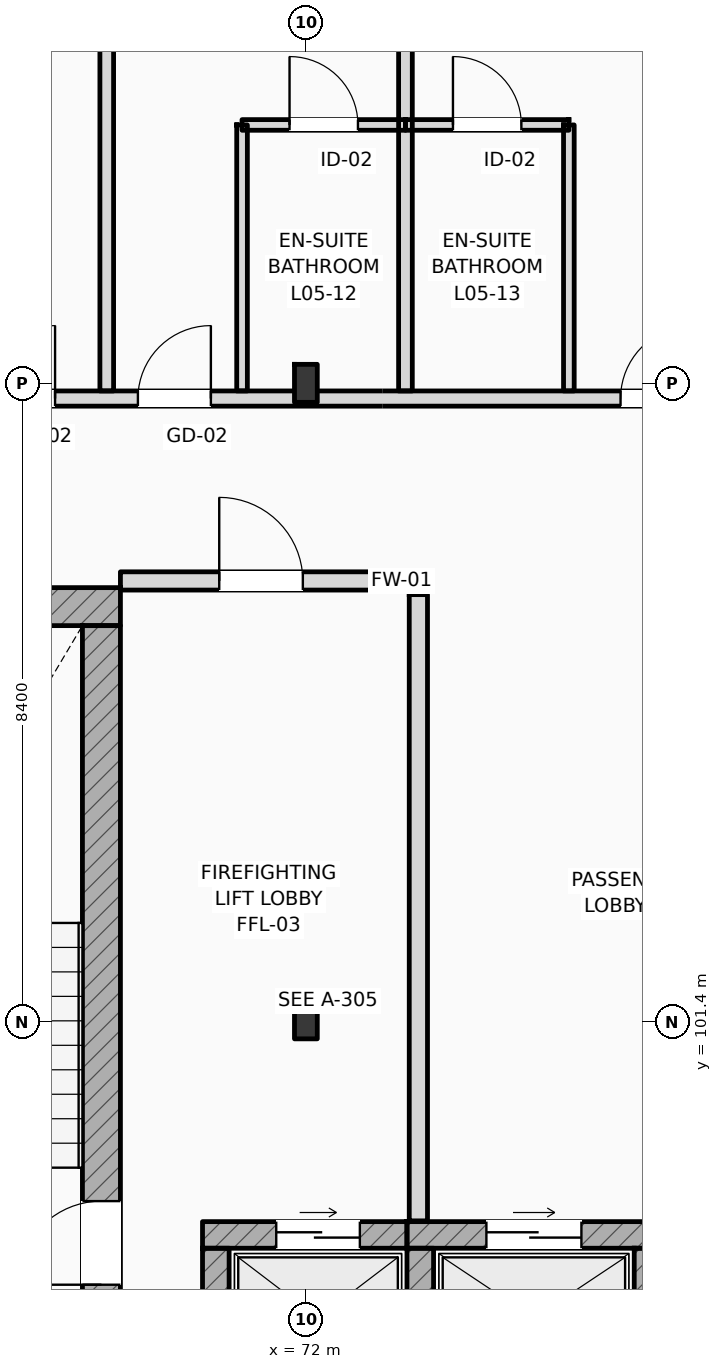
"""IFC4 building model, lengths in metres.
Left out: names, types, materials, properties, quantities, classifications, styles, units other than length and angle.
Written with IfcOpenShell. Run it as: python <this file> out.ifc"""

import sys

from ifc_helpers import new_model, si_unit, direction, frame, frame_2d, origin, origin_2d, place, context, subcontext, project, spatial, rectangle, i_section, extrude, element, fill, save


model = new_model("IFC4")
c1 = context("Model", 3, precision=1e-05, world=origin(), true_north=direction((0.0, 1.0)))
c2 = subcontext(c1, "Body", "Model", "MODEL_VIEW")
j1 = project(units=[si_unit("LENGTHUNIT", "METRE"), si_unit("PLANEANGLEUNIT", "RADIAN")], contexts=[c1])
p1 = place(None, origin())
s1 = spatial("IfcSite", under=j1, at=p1, CompositionType="ELEMENT")
p2 = place(p1, origin())
s2 = spatial("IfcBuilding", under=s1, at=p2, CompositionType="ELEMENT")
p3 = place(p2, frame((0.0, 0.0, 24.6)))
s3 = spatial("IfcBuildingStorey", under=s2, at=p3, CompositionType="ELEMENT", Elevation=24.6)
p4 = place(p3, frame((72.0, 101.4, 0.0), z_axis=(0.0, 0.0, 1.0), x_axis=(1.0, 0.0, 0.0)))
e1 = element("IfcColumn", 1, at=p4, inside=s3, PredefinedType="COLUMN", context=c2, shape_type="SweptSolid", body=[
    extrude(i_section(OverallWidth=0.3, OverallDepth=0.45, WebThickness=0.014, FlangeThickness=0.026, FilletRadius=0.027, at=origin_2d()), origin(), (0.0, 0.0, 1.0), 3.6),
])
p5 = place(p3, frame((72.0, 109.8, 0.0), z_axis=(0.0, 0.0, 1.0), x_axis=(1.0, 0.0, 0.0)))
e2 = element("IfcColumn", 2, at=p5, inside=s3, PredefinedType="COLUMN", context=c2, shape_type="SweptSolid", body=[
    extrude(i_section(OverallWidth=0.3, OverallDepth=0.5, WebThickness=0.014, FlangeThickness=0.028, FilletRadius=0.027, at=origin_2d()), origin(), (0.0, 0.0, 1.0), 3.6),
])
p6 = place(p3, frame((64.4, 106.862, 0.0), z_axis=(0.0, 0.0, 1.0), x_axis=(1.0, 0.0, 0.0)))
e3 = element("IfcWall", 3, at=p6, inside=s3, PredefinedType="SHEAR", context=c2, shape_type="SweptSolid", body=[
    extrude(rectangle(XDim=5.16, YDim=0.5, at=frame_2d((2.58, 0.0))), origin(), (0.0, 0.0, 1.0), 3.6),
])
p7 = place(p3, frame((69.31, 97.5, 0.0), z_axis=(0.0, 0.0, 1.0), x_axis=(0.0, 1.0, 0.0)))
e4 = element("IfcWall", 4, at=p7, inside=s3, PredefinedType="SHEAR", context=c2, shape_type="SweptSolid", body=[
    extrude(rectangle(XDim=9.112, YDim=0.5, at=frame_2d((4.556, 0.0))), origin(), (0.0, 0.0, 1.0), 3.6),
])
p8 = place(p7, frame((0.44, 0.0, 0.0)))
e5 = element("IfcOpeningElement", 5, at=p8, cuts=e4, PredefinedType="OPENING", context=c2, shape_type="SweptSolid", body=[
    extrude(rectangle(XDim=1.1, YDim=2.2, at=frame_2d((0.55, 1.1))), frame((0.0, 0.26, 0.0), z_axis=(0.0, -1.0, 0.0), x_axis=(1.0, 0.0, 0.0)), (0.0, 0.0, 1.0), 0.52),
])
p9 = place(p3, frame((70.64, 98.595, 0.0), z_axis=(0.0, 0.0, 1.0), x_axis=(1.0, 0.0, 0.0)))
e6 = element("IfcWall", 6, at=p9, inside=s3, PredefinedType="SHEAR", context=c2, shape_type="SweptSolid", body=[
    extrude(rectangle(XDim=2.69, YDim=0.35, at=frame_2d((1.345, 0.0))), origin(), (0.0, 0.0, 1.0), 3.34),
])
p10 = place(p9, frame((0.97, 0.0, 0.0)))
e7 = element("IfcOpeningElement", 7, at=p10, cuts=e6, PredefinedType="OPENING", context=c2, shape_type="SweptSolid", body=[
    extrude(rectangle(XDim=1.1, YDim=2.2, at=frame_2d((0.55, 1.1))), frame((0.0, 0.185, 0.0), z_axis=(0.0, -1.0, 0.0), x_axis=(1.0, 0.0, 0.0)), (0.0, 0.0, 1.0), 0.37),
])
p11 = place(p3, frame((70.815, 96.58, 0.0), z_axis=(0.0, 0.0, 1.0), x_axis=(0.0, 1.0, 0.0)))
e8 = element("IfcWall", 8, at=p11, inside=s3, PredefinedType="SHEAR", context=c2, shape_type="SweptSolid", body=[
    extrude(rectangle(XDim=1.84, YDim=0.35, at=frame_2d((0.92, 0.0))), origin(), (0.0, 0.0, 1.0), 3.34),
])
p12 = place(p3, frame((73.33, 98.595, 0.0), z_axis=(0.0, 0.0, 1.0), x_axis=(1.0, 0.0, 0.0)))
e9 = element("IfcWall", 9, at=p12, inside=s3, PredefinedType="SHEAR", context=c2, shape_type="SweptSolid", body=[
    extrude(rectangle(XDim=3.34, YDim=0.35, at=frame_2d((1.67, 0.0))), origin(), (0.0, 0.0, 1.0), 3.34),
])
p13 = place(p12, frame((1.045, 0.0, 0.0)))
e10 = element("IfcOpeningElement", 10, at=p13, cuts=e9, PredefinedType="OPENING", context=c2, shape_type="SweptSolid", body=[
    extrude(rectangle(XDim=1.25, YDim=2.25, at=frame_2d((0.625, 1.125))), frame((0.0, 0.185, 0.0), z_axis=(0.0, -1.0, 0.0), x_axis=(1.0, 0.0, 0.0)), (0.0, 0.0, 1.0), 0.37),
])
for number, where, z_axis, x_axis in (
    (11, (73.505, 96.58, 0.0), (0.0, 0.0, 1.0), (0.0, 1.0, 0.0)),
    (12, (76.495, 96.58, 0.0), (0.0, 0.0, 1.0), (0.0, 1.0, 0.0)),
):
    element("IfcWall", number, at=place(p3, frame(where, z_axis=z_axis, x_axis=x_axis)), inside=s3, PredefinedType="SHEAR", context=c2, shape_type="SweptSolid", body=[
        extrude(rectangle(XDim=1.84, YDim=0.35, at=frame_2d((0.92, 0.0))), origin(), (0.0, 0.0, 1.0), 3.34),
    ])
p14 = place(p3, frame((73.48, 98.78, 0.0), z_axis=(0.0, 0.0, 1.0), x_axis=(0.0, 1.0, 0.0)))
e13 = element("IfcWall", 13, at=p14, inside=s3, PredefinedType="STANDARD", context=c2, shape_type="SweptSolid", body=[
    extrude(rectangle(XDim=8.24, YDim=0.24, at=frame_2d((4.12, 0.0))), origin(), (0.0, 0.0, 1.0), 3.34),
])
p15 = place(p3, frame((69.56, 107.2, 0.0), z_axis=(0.0, 0.0, 1.0), x_axis=(1.0, 0.0, 0.0)))
e14 = element("IfcWall", 14, at=p15, inside=s3, PredefinedType="STANDARD", context=c2, shape_type="SweptSolid", body=[
    extrude(rectangle(XDim=4.1, YDim=0.24, at=frame_2d((2.05, 0.0))), origin(), (0.0, 0.0, 1.0), 3.34),
])
p16 = place(p15, frame((1.3, 0.0, 0.0)))
e15 = element("IfcOpeningElement", 15, at=p16, cuts=e14, PredefinedType="OPENING", context=c2, shape_type="SweptSolid", body=[
    extrude(rectangle(XDim=1.1, YDim=2.2, at=frame_2d((0.55, 1.1))), frame((0.0, 0.13, 0.0), z_axis=(0.0, -1.0, 0.0), x_axis=(1.0, 0.0, 0.0)), (0.0, 0.0, 1.0), 0.26),
])
p17 = place(p3, frame((10.65, 109.6, 0.0), z_axis=(0.0, 0.0, 1.0), x_axis=(1.0, 0.0, 0.0)))
e16 = element("IfcWall", 16, at=p17, inside=s3, PredefinedType="PARTITIONING", context=c2, shape_type="SweptSolid", body=[
    extrude(rectangle(XDim=109.21, YDim=0.2, at=frame_2d((54.605, 0.0))), origin(), (0.0, 0.0, 1.0), 2.78),
])
p18 = place(p17, frame((12.705, 0.0, 0.0)))
e17 = element("IfcOpeningElement", 17, at=p18, cuts=e16, PredefinedType="OPENING", context=c2, shape_type="SweptSolid", body=[
    extrude(rectangle(XDim=1.02, YDim=2.2, at=frame_2d((0.51, 1.1))), frame((0.0, 0.11, 0.0), z_axis=(0.0, -1.0, 0.0), x_axis=(1.0, 0.0, 0.0)), (0.0, 0.0, 1.0), 0.22),
])
p19 = place(p17, frame((19.26, 0.0, 0.0)))
e18 = element("IfcOpeningElement", 18, at=p19, cuts=e16, PredefinedType="OPENING", context=c2, shape_type="SweptSolid", body=[
    extrude(rectangle(XDim=1.02, YDim=2.2, at=frame_2d((0.51, 1.1))), frame((0.0, 0.11, 0.0), z_axis=(0.0, -1.0, 0.0), x_axis=(1.0, 0.0, 0.0)), (0.0, 0.0, 1.0), 0.22),
])
p20 = place(p17, frame((23.71, 0.0, 0.0)))
e19 = element("IfcOpeningElement", 19, at=p20, cuts=e16, PredefinedType="OPENING", context=c2, shape_type="SweptSolid", body=[
    extrude(rectangle(XDim=1.02, YDim=2.2, at=frame_2d((0.51, 1.1))), frame((0.0, 0.11, 0.0), z_axis=(0.0, -1.0, 0.0), x_axis=(1.0, 0.0, 0.0)), (0.0, 0.0, 1.0), 0.22),
])
p21 = place(p17, frame((27.66, 0.0, 0.0)))
e20 = element("IfcOpeningElement", 20, at=p21, cuts=e16, PredefinedType="OPENING", context=c2, shape_type="SweptSolid", body=[
    extrude(rectangle(XDim=1.02, YDim=2.2, at=frame_2d((0.51, 1.1))), frame((0.0, 0.11, 0.0), z_axis=(0.0, -1.0, 0.0), x_axis=(1.0, 0.0, 0.0)), (0.0, 0.0, 1.0), 0.22),
])
p22 = place(p17, frame((31.89, 0.0, 0.0)))
e21 = element("IfcOpeningElement", 21, at=p22, cuts=e16, PredefinedType="OPENING", context=c2, shape_type="SweptSolid", body=[
    extrude(rectangle(XDim=0.96, YDim=2.2, at=frame_2d((0.48, 1.1))), frame((0.0, 0.11, 0.0), z_axis=(0.0, -1.0, 0.0), x_axis=(1.0, 0.0, 0.0)), (0.0, 0.0, 1.0), 0.22),
])
p23 = place(p17, frame((33.94, 0.0, 0.0)))
e22 = element("IfcOpeningElement", 22, at=p23, cuts=e16, PredefinedType="OPENING", context=c2, shape_type="SweptSolid", body=[
    extrude(rectangle(XDim=0.96, YDim=2.2, at=frame_2d((0.48, 1.1))), frame((0.0, 0.11, 0.0), z_axis=(0.0, -1.0, 0.0), x_axis=(1.0, 0.0, 0.0)), (0.0, 0.0, 1.0), 0.22),
])
p24 = place(p17, frame((40.29, 0.0, 0.0)))
e23 = element("IfcOpeningElement", 23, at=p24, cuts=e16, PredefinedType="OPENING", context=c2, shape_type="SweptSolid", body=[
    extrude(rectangle(XDim=0.96, YDim=2.2, at=frame_2d((0.48, 1.1))), frame((0.0, 0.11, 0.0), z_axis=(0.0, -1.0, 0.0), x_axis=(1.0, 0.0, 0.0)), (0.0, 0.0, 1.0), 0.22),
])
p25 = place(p17, frame((42.34, 0.0, 0.0)))
e24 = element("IfcOpeningElement", 24, at=p25, cuts=e16, PredefinedType="OPENING", context=c2, shape_type="SweptSolid", body=[
    extrude(rectangle(XDim=0.96, YDim=2.2, at=frame_2d((0.48, 1.1))), frame((0.0, 0.11, 0.0), z_axis=(0.0, -1.0, 0.0), x_axis=(1.0, 0.0, 0.0)), (0.0, 0.0, 1.0), 0.22),
])
p26 = place(p17, frame((48.69, 0.0, 0.0)))
e25 = element("IfcOpeningElement", 25, at=p26, cuts=e16, PredefinedType="OPENING", context=c2, shape_type="SweptSolid", body=[
    extrude(rectangle(XDim=0.96, YDim=2.2, at=frame_2d((0.48, 1.1))), frame((0.0, 0.11, 0.0), z_axis=(0.0, -1.0, 0.0), x_axis=(1.0, 0.0, 0.0)), (0.0, 0.0, 1.0), 0.22),
])
p27 = place(p17, frame((50.74, 0.0, 0.0)))
e26 = element("IfcOpeningElement", 26, at=p27, cuts=e16, PredefinedType="OPENING", context=c2, shape_type="SweptSolid", body=[
    extrude(rectangle(XDim=0.96, YDim=2.2, at=frame_2d((0.48, 1.1))), frame((0.0, 0.11, 0.0), z_axis=(0.0, -1.0, 0.0), x_axis=(1.0, 0.0, 0.0)), (0.0, 0.0, 1.0), 0.22),
])
p28 = place(p17, frame((57.09, 0.0, 0.0)))
e27 = element("IfcOpeningElement", 27, at=p28, cuts=e16, PredefinedType="OPENING", context=c2, shape_type="SweptSolid", body=[
    extrude(rectangle(XDim=0.96, YDim=2.2, at=frame_2d((0.48, 1.1))), frame((0.0, 0.11, 0.0), z_axis=(0.0, -1.0, 0.0), x_axis=(1.0, 0.0, 0.0)), (0.0, 0.0, 1.0), 0.22),
])
p29 = place(p17, frame((59.14, 0.0, 0.0)))
e28 = element("IfcOpeningElement", 28, at=p29, cuts=e16, PredefinedType="OPENING", context=c2, shape_type="SweptSolid", body=[
    extrude(rectangle(XDim=0.96, YDim=2.2, at=frame_2d((0.48, 1.1))), frame((0.0, 0.11, 0.0), z_axis=(0.0, -1.0, 0.0), x_axis=(1.0, 0.0, 0.0)), (0.0, 0.0, 1.0), 0.22),
])
p30 = place(p17, frame((65.49, 0.0, 0.0)))
e29 = element("IfcOpeningElement", 29, at=p30, cuts=e16, PredefinedType="OPENING", context=c2, shape_type="SweptSolid", body=[
    extrude(rectangle(XDim=0.96, YDim=2.2, at=frame_2d((0.48, 1.1))), frame((0.0, 0.11, 0.0), z_axis=(0.0, -1.0, 0.0), x_axis=(1.0, 0.0, 0.0)), (0.0, 0.0, 1.0), 0.22),
])
p31 = place(p17, frame((67.54, 0.0, 0.0)))
e30 = element("IfcOpeningElement", 30, at=p31, cuts=e16, PredefinedType="OPENING", context=c2, shape_type="SweptSolid", body=[
    extrude(rectangle(XDim=0.96, YDim=2.2, at=frame_2d((0.48, 1.1))), frame((0.0, 0.11, 0.0), z_axis=(0.0, -1.0, 0.0), x_axis=(1.0, 0.0, 0.0)), (0.0, 0.0, 1.0), 0.22),
])
p32 = place(p17, frame((73.89, 0.0, 0.0)))
e31 = element("IfcOpeningElement", 31, at=p32, cuts=e16, PredefinedType="OPENING", context=c2, shape_type="SweptSolid", body=[
    extrude(rectangle(XDim=0.96, YDim=2.2, at=frame_2d((0.48, 1.1))), frame((0.0, 0.11, 0.0), z_axis=(0.0, -1.0, 0.0), x_axis=(1.0, 0.0, 0.0)), (0.0, 0.0, 1.0), 0.22),
])
p33 = place(p17, frame((78.09, 0.0, 0.0)))
e32 = element("IfcOpeningElement", 32, at=p33, cuts=e16, PredefinedType="OPENING", context=c2, shape_type="SweptSolid", body=[
    extrude(rectangle(XDim=0.96, YDim=2.2, at=frame_2d((0.48, 1.1))), frame((0.0, 0.11, 0.0), z_axis=(0.0, -1.0, 0.0), x_axis=(1.0, 0.0, 0.0)), (0.0, 0.0, 1.0), 0.22),
])
p34 = place(p17, frame((82.29, 0.0, 0.0)))
e33 = element("IfcOpeningElement", 33, at=p34, cuts=e16, PredefinedType="OPENING", context=c2, shape_type="SweptSolid", body=[
    extrude(rectangle(XDim=0.96, YDim=2.2, at=frame_2d((0.48, 1.1))), frame((0.0, 0.11, 0.0), z_axis=(0.0, -1.0, 0.0), x_axis=(1.0, 0.0, 0.0)), (0.0, 0.0, 1.0), 0.22),
])
p35 = place(p17, frame((86.49, 0.0, 0.0)))
e34 = element("IfcOpeningElement", 34, at=p35, cuts=e16, PredefinedType="OPENING", context=c2, shape_type="SweptSolid", body=[
    extrude(rectangle(XDim=0.96, YDim=2.2, at=frame_2d((0.48, 1.1))), frame((0.0, 0.11, 0.0), z_axis=(0.0, -1.0, 0.0), x_axis=(1.0, 0.0, 0.0)), (0.0, 0.0, 1.0), 0.22),
])
p36 = place(p17, frame((88.54, 0.0, 0.0)))
e35 = element("IfcOpeningElement", 35, at=p36, cuts=e16, PredefinedType="OPENING", context=c2, shape_type="SweptSolid", body=[
    extrude(rectangle(XDim=0.96, YDim=2.2, at=frame_2d((0.48, 1.1))), frame((0.0, 0.11, 0.0), z_axis=(0.0, -1.0, 0.0), x_axis=(1.0, 0.0, 0.0)), (0.0, 0.0, 1.0), 0.22),
])
p37 = place(p17, frame((94.89, 0.0, 0.0)))
e36 = element("IfcOpeningElement", 36, at=p37, cuts=e16, PredefinedType="OPENING", context=c2, shape_type="SweptSolid", body=[
    extrude(rectangle(XDim=0.96, YDim=2.2, at=frame_2d((0.48, 1.1))), frame((0.0, 0.11, 0.0), z_axis=(0.0, -1.0, 0.0), x_axis=(1.0, 0.0, 0.0)), (0.0, 0.0, 1.0), 0.22),
])
p38 = place(p17, frame((96.94, 0.0, 0.0)))
e37 = element("IfcOpeningElement", 37, at=p38, cuts=e16, PredefinedType="OPENING", context=c2, shape_type="SweptSolid", body=[
    extrude(rectangle(XDim=0.96, YDim=2.2, at=frame_2d((0.48, 1.1))), frame((0.0, 0.11, 0.0), z_axis=(0.0, -1.0, 0.0), x_axis=(1.0, 0.0, 0.0)), (0.0, 0.0, 1.0), 0.22),
])
p39 = place(p17, frame((103.29, 0.0, 0.0)))
e38 = element("IfcOpeningElement", 38, at=p39, cuts=e16, PredefinedType="OPENING", context=c2, shape_type="SweptSolid", body=[
    extrude(rectangle(XDim=0.96, YDim=2.2, at=frame_2d((0.48, 1.1))), frame((0.0, 0.11, 0.0), z_axis=(0.0, -1.0, 0.0), x_axis=(1.0, 0.0, 0.0)), (0.0, 0.0, 1.0), 0.22),
])
p40 = place(p17, frame((105.25, 0.0, 0.0)))
e39 = element("IfcOpeningElement", 39, at=p40, cuts=e16, PredefinedType="OPENING", context=c2, shape_type="SweptSolid", body=[
    extrude(rectangle(XDim=0.96, YDim=2.2, at=frame_2d((0.48, 1.1))), frame((0.0, 0.11, 0.0), z_axis=(0.0, -1.0, 0.0), x_axis=(1.0, 0.0, 0.0)), (0.0, 0.0, 1.0), 0.22),
])
p41 = place(p17, frame((2.716, 0.0, 0.0)))
e40 = element("IfcOpeningElement", 40, at=p41, cuts=e16, PredefinedType="OPENING", context=c2, shape_type="SweptSolid", body=[
    extrude(rectangle(XDim=1.35, YDim=2.25, at=frame_2d((0.675, 1.125))), frame((0.0, 0.11, 0.0), z_axis=(0.0, -1.0, 0.0), x_axis=(1.0, 0.0, 0.0)), (0.0, 0.0, 1.0), 0.22),
])
p42 = place(p17, frame((6.65, 0.0, 0.0)))
e41 = element("IfcOpeningElement", 41, at=p42, cuts=e16, PredefinedType="OPENING", context=c2, shape_type="SweptSolid", body=[
    extrude(rectangle(XDim=1.35, YDim=2.25, at=frame_2d((0.675, 1.125))), frame((0.0, 0.11, 0.0), z_axis=(0.0, -1.0, 0.0), x_axis=(1.0, 0.0, 0.0)), (0.0, 0.0, 1.0), 0.22),
])
p43 = place(p17, frame((10.583, 0.0, 0.0)))
e42 = element("IfcOpeningElement", 42, at=p43, cuts=e16, PredefinedType="OPENING", context=c2, shape_type="SweptSolid", body=[
    extrude(rectangle(XDim=1.35, YDim=2.25, at=frame_2d((0.675, 1.125))), frame((0.0, 0.11, 0.0), z_axis=(0.0, -1.0, 0.0), x_axis=(1.0, 0.0, 0.0)), (0.0, 0.0, 1.0), 0.22),
])
p44 = place(p3, frame((69.38, 109.7, 0.0), z_axis=(0.0, 0.0, 1.0), x_axis=(0.0, 1.0, 0.0)))
e43 = element("IfcWall", 43, at=p44, inside=s3, PredefinedType="PARTITIONING", context=c2, shape_type="SweptSolid", body=[
    extrude(rectangle(XDim=8.15, YDim=0.18, at=frame_2d((4.075, 0.0))), origin(), (0.0, 0.0, 1.0), 3.03),
])
p45 = place(p3, frame((73.31, 109.7, 0.0), z_axis=(0.0, 0.0, 1.0), x_axis=(0.0, 1.0, 0.0)))
e44 = element("IfcWall", 44, at=p45, inside=s3, PredefinedType="PARTITIONING", context=c2, shape_type="SweptSolid", body=[
    extrude(rectangle(XDim=8.15, YDim=0.18, at=frame_2d((4.075, 0.0))), origin(), (0.0, 0.0, 1.0), 3.34),
])
p46 = place(p3, frame((71.16, 109.7, 0.0), z_axis=(0.0, 0.0, 1.0), x_axis=(0.0, 1.0, 0.0)))
e45 = element("IfcWall", 45, at=p46, inside=s3, PredefinedType="PARTITIONING", context=c2, shape_type="SweptSolid", body=[
    extrude(rectangle(XDim=3.5, YDim=0.14, at=frame_2d((1.75, 0.0))), origin(), (0.0, 0.0, 1.0), 3.34),
])
p47 = place(p3, frame((71.16, 113.2, 0.0), z_axis=(0.0, 0.0, 1.0), x_axis=(1.0, 0.0, 0.0)))
e46 = element("IfcWall", 46, at=p47, inside=s3, PredefinedType="PARTITIONING", context=c2, shape_type="SweptSolid", body=[
    extrude(rectangle(XDim=2.15, YDim=0.14, at=frame_2d((1.075, 0.0))), origin(), (0.0, 0.0, 1.0), 3.34),
])
p48 = place(p47, frame((0.625, 0.0, 0.0)))
e47 = element("IfcOpeningElement", 47, at=p48, cuts=e46, PredefinedType="OPENING", context=c2, shape_type="SweptSolid", body=[
    extrude(rectangle(XDim=0.9, YDim=2.1, at=frame_2d((0.45, 1.05))), frame((0.0, 0.08, 0.0), z_axis=(0.0, -1.0, 0.0), x_axis=(1.0, 0.0, 0.0)), (0.0, 0.0, 1.0), 0.16),
])
p49 = place(p3, frame((75.46, 109.7, 0.0), z_axis=(0.0, 0.0, 1.0), x_axis=(0.0, 1.0, 0.0)))
e48 = element("IfcWall", 48, at=p49, inside=s3, PredefinedType="PARTITIONING", context=c2, shape_type="SweptSolid", body=[
    extrude(rectangle(XDim=3.5, YDim=0.14, at=frame_2d((1.75, 0.0))), origin(), (0.0, 0.0, 1.0), 3.34),
])
p50 = place(p3, frame((73.31, 113.2, 0.0), z_axis=(0.0, 0.0, 1.0), x_axis=(1.0, 0.0, 0.0)))
e49 = element("IfcWall", 49, at=p50, inside=s3, PredefinedType="PARTITIONING", context=c2, shape_type="SweptSolid", body=[
    extrude(rectangle(XDim=2.15, YDim=0.14, at=frame_2d((1.075, 0.0))), origin(), (0.0, 0.0, 1.0), 3.34),
])
p51 = place(p50, frame((0.625, 0.0, 0.0)))
e50 = element("IfcOpeningElement", 50, at=p51, cuts=e49, PredefinedType="OPENING", context=c2, shape_type="SweptSolid", body=[
    extrude(rectangle(XDim=0.9, YDim=2.1, at=frame_2d((0.45, 1.05))), frame((0.0, 0.08, 0.0), z_axis=(0.0, -1.0, 0.0), x_axis=(1.0, 0.0, 0.0)), (0.0, 0.0, 1.0), 0.16),
])
p52 = place(p8, origin())
e51 = element("IfcDoor", 51, at=p52, inside=s3, OperationType="SINGLE_SWING_LEFT", PredefinedType="DOOR", context=c2, shape_type="SweptSolid", body=[
    extrude(rectangle(XDim=1.1, YDim=2.2, at=frame_2d((0.55, 1.1))), frame((0.0, 0.025, 0.0), z_axis=(0.0, -1.0, 0.0), x_axis=(1.0, 0.0, 0.0)), (0.0, 0.0, 1.0), 0.05),
])
fill(e5, e51)
p53 = place(p10, origin())
e52 = element("IfcDoor", 52, at=p53, inside=s3, OperationType="SLIDING_TO_LEFT", PredefinedType="DOOR", context=c2, shape_type="SweptSolid", body=[
    extrude(rectangle(XDim=1.1, YDim=2.2, at=frame_2d((0.55, 1.1))), frame((0.0, 0.025, 0.0), z_axis=(0.0, -1.0, 0.0), x_axis=(1.0, 0.0, 0.0)), (0.0, 0.0, 1.0), 0.05),
])
fill(e7, e52)
p54 = place(p13, origin())
e53 = element("IfcDoor", 53, at=p54, inside=s3, OperationType="SLIDING_TO_LEFT", PredefinedType="DOOR", context=c2, shape_type="SweptSolid", body=[
    extrude(rectangle(XDim=1.25, YDim=2.25, at=frame_2d((0.625, 1.125))), frame((0.0, 0.025, 0.0), z_axis=(0.0, -1.0, 0.0), x_axis=(1.0, 0.0, 0.0)), (0.0, 0.0, 1.0), 0.05),
])
fill(e10, e53)
p55 = place(p16, origin())
e54 = element("IfcDoor", 54, at=p55, inside=s3, OperationType="SINGLE_SWING_LEFT", PredefinedType="DOOR", context=c2, shape_type="SweptSolid", body=[
    extrude(rectangle(XDim=1.1, YDim=2.2, at=frame_2d((0.55, 1.1))), frame((0.0, 0.025, 0.0), z_axis=(0.0, -1.0, 0.0), x_axis=(1.0, 0.0, 0.0)), (0.0, 0.0, 1.0), 0.05),
])
fill(e15, e54)
p56 = place(p28, origin())
e55 = element("IfcDoor", 55, at=p56, inside=s3, OperationType="SINGLE_SWING_RIGHT", PredefinedType="DOOR", context=c2, shape_type="SweptSolid", body=[
    extrude(rectangle(XDim=0.96, YDim=2.2, at=frame_2d((0.48, 1.1))), frame((0.0, 0.025, 0.0), z_axis=(0.0, -1.0, 0.0), x_axis=(1.0, 0.0, 0.0)), (0.0, 0.0, 1.0), 0.05),
])
fill(e27, e55)
p57 = place(p29, origin())
e56 = element("IfcDoor", 56, at=p57, inside=s3, OperationType="SINGLE_SWING_RIGHT", PredefinedType="DOOR", context=c2, shape_type="SweptSolid", body=[
    extrude(rectangle(XDim=0.96, YDim=2.2, at=frame_2d((0.48, 1.1))), frame((0.0, 0.025, 0.0), z_axis=(0.0, -1.0, 0.0), x_axis=(1.0, 0.0, 0.0)), (0.0, 0.0, 1.0), 0.05),
])
fill(e28, e56)
p58 = place(p48, origin())
e57 = element("IfcDoor", 57, at=p58, inside=s3, OperationType="SINGLE_SWING_LEFT", PredefinedType="DOOR", context=c2, shape_type="SweptSolid", body=[
    extrude(rectangle(XDim=0.9, YDim=2.1, at=frame_2d((0.45, 1.05))), frame((0.0, 0.025, 0.0), z_axis=(0.0, -1.0, 0.0), x_axis=(1.0, 0.0, 0.0)), (0.0, 0.0, 1.0), 0.05),
])
fill(e47, e57)
p59 = place(p30, origin())
e58 = element("IfcDoor", 58, at=p59, inside=s3, OperationType="SINGLE_SWING_RIGHT", PredefinedType="DOOR", context=c2, shape_type="SweptSolid", body=[
    extrude(rectangle(XDim=0.96, YDim=2.2, at=frame_2d((0.48, 1.1))), frame((0.0, 0.025, 0.0), z_axis=(0.0, -1.0, 0.0), x_axis=(1.0, 0.0, 0.0)), (0.0, 0.0, 1.0), 0.05),
])
fill(e29, e58)
p60 = place(p51, origin())
e59 = element("IfcDoor", 59, at=p60, inside=s3, OperationType="SINGLE_SWING_LEFT", PredefinedType="DOOR", context=c2, shape_type="SweptSolid", body=[
    extrude(rectangle(XDim=0.9, YDim=2.1, at=frame_2d((0.45, 1.05))), frame((0.0, 0.025, 0.0), z_axis=(0.0, -1.0, 0.0), x_axis=(1.0, 0.0, 0.0)), (0.0, 0.0, 1.0), 0.05),
])
fill(e50, e59)
save(model, sys.argv[1])
